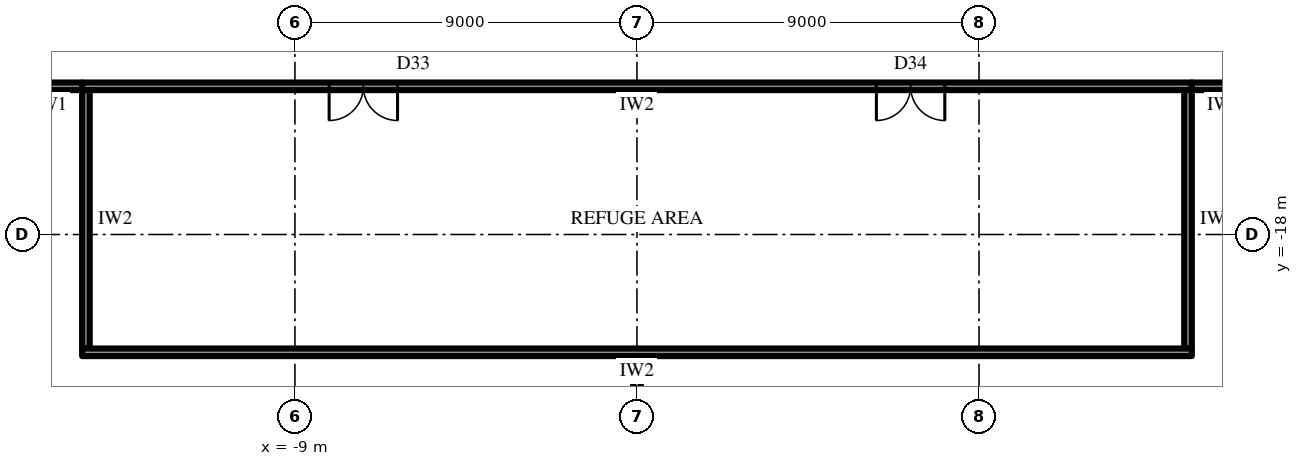
"""IFC4 building model, lengths in metres.
Left out: names, types, materials, properties, quantities, classifications, styles, units other than length and angle.
Written with IfcOpenShell. Run it as: python <this file> out.ifc"""

import sys

from ifc_helpers import new_model, si_unit, direction, frame, frame_2d, origin, place, context, subcontext, project, spatial, rectangle, extrude, element, fill, save


model = new_model("IFC4")
c1 = context("Model", 3, precision=1e-05, world=origin(), true_north=direction((0.0, 1.0)))
c2 = subcontext(c1, "Body", "Model", "MODEL_VIEW")
j1 = project(units=[si_unit("LENGTHUNIT", "METRE"), si_unit("PLANEANGLEUNIT", "RADIAN")], contexts=[c1])
p1 = place(None, origin())
s1 = spatial("IfcSite", under=j1, at=p1, CompositionType="ELEMENT")
p2 = place(p1, origin())
s2 = spatial("IfcBuilding", under=s1, at=p2, CompositionType="ELEMENT")
p3 = place(p2, frame((0.0, 0.0, 299.5)))
s3 = spatial("IfcBuildingStorey", under=s2, at=p3, CompositionType="ELEMENT", Elevation=299.5)
p4 = place(p3, frame((14.6, -14.1, 0.0), z_axis=(0.0, 0.0, 1.0), x_axis=(-1.0, 0.0, 0.0)))
e1 = element("IfcWall", 1, at=p4, inside=s3, PredefinedType="PARTITIONING", context=c2, shape_type="SweptSolid", body=[
    extrude(rectangle(XDim=29.2, YDim=0.2, at=frame_2d((14.6, 0.0))), origin(), (0.0, 0.0, 1.0), 6.7),
])
p5 = place(p4, frame((20.9, 0.0, 0.0)))
e2 = element("IfcOpeningElement", 2, at=p5, cuts=e1, PredefinedType="OPENING", context=c2, shape_type="SweptSolid", body=[
    extrude(rectangle(XDim=1.8, YDim=2.4, at=frame_2d((0.9, 1.2))), frame((0.0, 0.11, 0.0), z_axis=(0.0, -1.0, 0.0), x_axis=(1.0, 0.0, 0.0)), (0.0, 0.0, 1.0), 0.22),
])
p6 = place(p4, frame((6.5, 0.0, 0.0)))
e3 = element("IfcOpeningElement", 3, at=p6, cuts=e1, PredefinedType="OPENING", context=c2, shape_type="SweptSolid", body=[
    extrude(rectangle(XDim=1.8, YDim=2.4, at=frame_2d((0.9, 1.2))), frame((0.0, 0.11, 0.0), z_axis=(0.0, -1.0, 0.0), x_axis=(1.0, 0.0, 0.0)), (0.0, 0.0, 1.0), 0.22),
])
for number, where, z_axis, x_axis in (
    (4, (14.5, -14.2, 0.0), (0.0, 0.0, 1.0), (0.0, -1.0, 0.0)),
    (5, (-14.5, -14.2, 0.0), (0.0, 0.0, 1.0), (0.0, -1.0, 0.0)),
):
    element("IfcWall", number, at=place(p3, frame(where, z_axis=z_axis, x_axis=x_axis)), inside=s3, PredefinedType="PARTITIONING", context=c2, shape_type="SweptSolid", body=[
        extrude(rectangle(XDim=6.8, YDim=0.2, at=frame_2d((3.4, 0.0))), origin(), (0.0, 0.0, 1.0), 6.7),
    ])
p7 = place(p3, frame((14.6, -21.1, 0.0), z_axis=(0.0, 0.0, 1.0), x_axis=(-1.0, 0.0, 0.0)))
e6 = element("IfcWall", 6, at=p7, inside=s3, PredefinedType="PARTITIONING", context=c2, shape_type="SweptSolid", body=[
    extrude(rectangle(XDim=29.2, YDim=0.2, at=frame_2d((14.6, 0.0))), origin(), (0.0, 0.0, 1.0), 6.7),
])
for number, where, z_axis, x_axis in (
    (7, (-14.6, -14.1, 0.0), (0.0, 0.0, 1.0), (-1.0, 0.0, 0.0)),
    (8, (16.3, -14.1, 0.0), (0.0, 0.0, 1.0), (-1.0, 0.0, 0.0)),
):
    element("IfcWall", number, at=place(p3, frame(where, z_axis=z_axis, x_axis=x_axis)), inside=s3, PredefinedType="PARTITIONING", context=c2, shape_type="SweptSolid", body=[
        extrude(rectangle(XDim=1.7, YDim=0.2, at=frame_2d((0.85, 0.0))), origin(), (0.0, 0.0, 1.0), 6.7),
    ])
p8 = place(p3, frame((0.0, -21.2, 0.0), z_axis=(0.0, 0.0, 1.0), x_axis=(0.0, -1.0, 0.0)))
e9 = element("IfcWall", 9, at=p8, inside=s3, PredefinedType="PARTITIONING", context=c2, shape_type="SweptSolid", body=[
    extrude(rectangle(XDim=7.61, YDim=0.2, at=frame_2d((3.805, 0.0))), origin(), (0.0, 0.0, 1.0), 2.7),
])
p9 = place(p5, origin())
e10 = element("IfcDoor", 10, at=p9, inside=s3, OperationType="DOUBLE_DOOR_SINGLE_SWING", PredefinedType="DOOR", context=c2, shape_type="SweptSolid", body=[
    extrude(rectangle(XDim=1.8, YDim=2.4, at=frame_2d((0.9, 1.2))), frame((0.0, 0.025, 0.0), z_axis=(0.0, -1.0, 0.0), x_axis=(1.0, 0.0, 0.0)), (0.0, 0.0, 1.0), 0.05),
])
fill(e2, e10)
p10 = place(p6, origin())
e11 = element("IfcDoor", 11, at=p10, inside=s3, OperationType="DOUBLE_DOOR_SINGLE_SWING", PredefinedType="DOOR", context=c2, shape_type="SweptSolid", body=[
    extrude(rectangle(XDim=1.8, YDim=2.4, at=frame_2d((0.9, 1.2))), frame((0.0, 0.025, 0.0), z_axis=(0.0, -1.0, 0.0), x_axis=(1.0, 0.0, 0.0)), (0.0, 0.0, 1.0), 0.05),
])
fill(e3, e11)
save(model, sys.argv[1])
